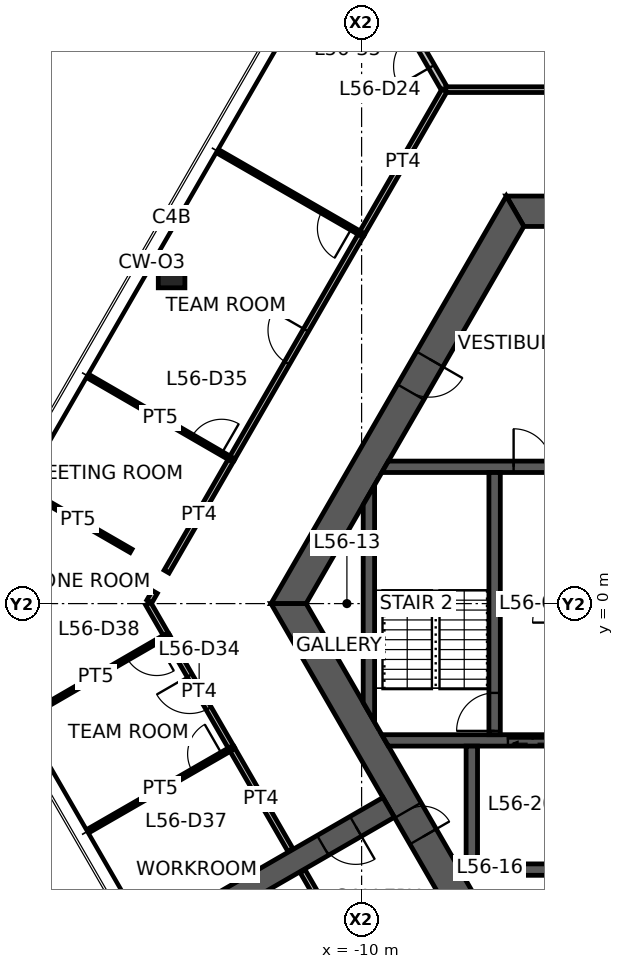
"""IFC4 building model, lengths in metres.
Left out: names, types, materials, properties, quantities, classifications, styles, units other than length and angle.
Written with IfcOpenShell. Run it as: python <this file> out.ifc"""

import sys

from ifc_helpers import new_model, si_unit, direction, frame, frame_2d, origin, origin_2d, place, context, subcontext, project, spatial, polyline, rectangle, hollow_rectangle, outline, extrude, element, fill, save


model = new_model("IFC4")
c1 = context("Model", 3, precision=1e-05, world=origin(), true_north=direction((0.0, 1.0)))
c2 = subcontext(c1, "Body", "Model", "MODEL_VIEW")
j1 = project(units=[si_unit("LENGTHUNIT", "METRE"), si_unit("PLANEANGLEUNIT", "RADIAN")], contexts=[c1])
p1 = place(None, origin())
s1 = spatial("IfcSite", under=j1, at=p1, CompositionType="ELEMENT")
p2 = place(p1, origin())
s2 = spatial("IfcBuilding", under=s1, at=p2, CompositionType="ELEMENT")
p3 = place(p2, frame((0.0, 0.0, 224.5)))
s3 = spatial("IfcBuildingStorey", under=s2, at=p3, CompositionType="ELEMENT", Elevation=224.5)
p4 = place(p3, frame((-15.0, 8.66, 0.0), z_axis=(0.0, 0.0, 1.0), x_axis=(1.0, 0.0, 0.0)))
e1 = element("IfcColumn", 1, at=p4, inside=s3, PredefinedType="COLUMN", context=c2, shape_type="SweptSolid", body=[
    extrude(hollow_rectangle(XDim=0.7, YDim=0.7, WallThickness=0.032, at=origin_2d()), origin(), (0.0, 0.0, 1.0), 3.9),
])
p5 = place(p3, frame((5.961, 10.325, 0.0), z_axis=(0.0, 0.0, 1.0), x_axis=(-1.0, 0.0, 0.0)))
e2 = element("IfcWall", 2, at=p5, inside=s3, PredefinedType="SHEAR", context=c2, shape_type="SweptSolid", body=[
    extrude(outline(polyline([(-0.231, -0.4), (4.636, -0.4), (5.536, -0.4), (6.386, -0.4), (7.286, -0.4), (12.153, -0.4), (11.691, 0.4), (7.286, 0.4), (6.386, 0.4), (5.536, 0.4), (4.636, 0.4), (0.231, 0.4), (-0.231, -0.4)])), origin(), (0.0, 0.0, 1.0), 3.9),
])
p6 = place(p5, frame((6.386, 0.0, 0.0)))
e3 = element("IfcOpeningElement", 3, at=p6, cuts=e2, PredefinedType="OPENING", context=c2, shape_type="SweptSolid", body=[
    extrude(rectangle(XDim=0.9, YDim=2.1, at=frame_2d((0.45, 1.05))), frame((0.0, 0.41, 0.0), z_axis=(0.0, -1.0, 0.0), x_axis=(1.0, 0.0, 0.0)), (0.0, 0.0, 1.0), 0.82),
])
p7 = place(p5, frame((4.636, 0.0, 0.0)))
e4 = element("IfcOpeningElement", 4, at=p7, cuts=e2, PredefinedType="OPENING", context=c2, shape_type="SweptSolid", body=[
    extrude(rectangle(XDim=0.9, YDim=2.1, at=frame_2d((0.45, 1.05))), frame((0.0, 0.41, 0.0), z_axis=(0.0, -1.0, 0.0), x_axis=(1.0, 0.0, 0.0)), (0.0, 0.0, 1.0), 0.82),
])
p8 = place(p3, frame((-5.961, 10.325, 0.0), z_axis=(0.0, 0.0, 1.0), x_axis=(-0.500004296715, -0.866022923061, 0.0)))
e5 = element("IfcWall", 5, at=p8, inside=s3, PredefinedType="SHEAR", context=c2, shape_type="SweptSolid", body=[
    extrude(outline(polyline([(-0.231, -0.4), (4.494, -0.4), (5.494, -0.4), (12.153, -0.4), (11.691, 0.4), (5.494, 0.4), (4.494, 0.4), (0.231, 0.4), (-0.231, -0.4)])), origin(), (0.0, 0.0, 1.0), 3.9),
])
p9 = place(p8, frame((4.494, 0.0, 0.0)))
e6 = element("IfcOpeningElement", 6, at=p9, cuts=e5, PredefinedType="OPENING", context=c2, shape_type="SweptSolid", body=[
    extrude(rectangle(XDim=1.0, YDim=2.1, at=frame_2d((0.5, 1.05))), frame((0.0, 0.41, 0.0), z_axis=(0.0, -1.0, 0.0), x_axis=(1.0, 0.0, 0.0)), (0.0, 0.0, 1.0), 0.82),
])
p10 = place(p3, frame((-11.922, 0.0, 0.0), z_axis=(0.0, 0.0, 1.0), x_axis=(0.500004296715, -0.866022923061, 0.0)))
e7 = element("IfcWall", 7, at=p10, inside=s3, PredefinedType="SHEAR", context=c2, shape_type="SweptSolid", body=[
    extrude(outline(polyline([(-0.231, -0.4), (6.281, -0.4), (7.081, -0.4), (12.153, -0.4), (11.691, 0.4), (7.081, 0.4), (6.281, 0.4), (0.231, 0.4), (-0.231, -0.4)])), origin(), (0.0, 0.0, 1.0), 3.9),
])
p11 = place(p10, frame((6.281, 0.0, 0.0)))
e8 = element("IfcOpeningElement", 8, at=p11, cuts=e7, PredefinedType="OPENING", context=c2, shape_type="SweptSolid", body=[
    extrude(rectangle(XDim=0.8, YDim=2.1, at=frame_2d((0.4, 1.05))), frame((0.0, 0.41, 0.0), z_axis=(0.0, -1.0, 0.0), x_axis=(1.0, 0.0, 0.0)), (0.0, 0.0, 1.0), 0.82),
])
p12 = place(p3, frame((-9.288, -5.363, 0.0), z_axis=(0.0, 0.0, 1.0), x_axis=(-0.866027473358, -0.499996415376, 0.0)))
e9 = element("IfcWall", 9, at=p12, inside=s3, PredefinedType="SHEAR", context=c2, shape_type="SweptSolid", body=[
    extrude(rectangle(XDim=7.045, YDim=0.6, at=frame_2d((3.523, 0.0))), origin(), (0.0, 0.0, 1.0), 3.9),
])
p13 = place(p12, frame((1.0, 0.0, 0.0)))
e10 = element("IfcOpeningElement", 10, at=p13, cuts=e9, PredefinedType="OPENING", context=c2, shape_type="SweptSolid", body=[
    extrude(rectangle(XDim=1.0, YDim=2.1, at=frame_2d((0.5, 1.05))), frame((0.0, 0.31, 0.0), z_axis=(0.0, -1.0, 0.0), x_axis=(1.0, 0.0, 0.0)), (0.0, 0.0, 1.0), 0.62),
])
p14 = place(p3, frame((-9.382, 3.6, 0.0), z_axis=(0.0, 0.0, 1.0), x_axis=(1.0, 0.0, 0.0)))
e11 = element("IfcWall", 11, at=p14, inside=s3, PredefinedType="SHEAR", context=c2, shape_type="SweptSolid", body=[
    extrude(outline(polyline([(-0.087, -0.15), (3.382, -0.15), (4.382, -0.15), (5.782, -0.15), (6.882, -0.15), (7.932, -0.15), (7.932, 0.15), (6.882, 0.15), (5.782, 0.15), (4.382, 0.15), (3.382, 0.15), (0.087, 0.15), (-0.087, -0.15)])), origin(), (0.0, 0.0, 1.0), 3.9),
])
p15 = place(p14, frame((3.382, 0.0, 0.0)))
e12 = element("IfcOpeningElement", 12, at=p15, cuts=e11, PredefinedType="OPENING", context=c2, shape_type="SweptSolid", body=[
    extrude(rectangle(XDim=1.0, YDim=2.1, at=frame_2d((0.5, 1.05))), frame((0.0, 0.16, 0.0), z_axis=(0.0, -1.0, 0.0), x_axis=(1.0, 0.0, 0.0)), (0.0, 0.0, 1.0), 0.32),
])
p16 = place(p14, frame((5.782, 0.0, 0.0)))
e13 = element("IfcOpeningElement", 13, at=p16, cuts=e11, PredefinedType="OPENING", context=c2, shape_type="SweptSolid", body=[
    extrude(rectangle(XDim=1.1, YDim=2.1, at=frame_2d((0.55, 1.05))), frame((0.0, 0.16, 0.0), z_axis=(0.0, -1.0, 0.0), x_axis=(1.0, 0.0, 0.0)), (0.0, 0.0, 1.0), 0.32),
])
p17 = place(p3, frame((-9.382, -3.6, 0.0), z_axis=(0.0, 0.0, 1.0), x_axis=(1.0, 0.0, 0.0)))
e14 = element("IfcWall", 14, at=p17, inside=s3, PredefinedType="SHEAR", context=c2, shape_type="SweptSolid", body=[
    extrude(outline(polyline([(0.087, -0.15), (3.232, -0.15), (4.532, -0.15), (5.782, -0.15), (6.882, -0.15), (7.932, -0.15), (7.932, 0.15), (6.882, 0.15), (5.782, 0.15), (4.532, 0.15), (3.232, 0.15), (-0.087, 0.15), (0.087, -0.15)])), origin(), (0.0, 0.0, 1.0), 3.9),
])
p18 = place(p17, frame((5.782, 0.0, 0.0)))
e15 = element("IfcOpeningElement", 15, at=p18, cuts=e14, PredefinedType="OPENING", context=c2, shape_type="SweptSolid", body=[
    extrude(rectangle(XDim=1.1, YDim=2.1, at=frame_2d((0.55, 1.05))), frame((0.0, 0.16, 0.0), z_axis=(0.0, -1.0, 0.0), x_axis=(1.0, 0.0, 0.0)), (0.0, 0.0, 1.0), 0.32),
])
p19 = place(p17, frame((3.232, 0.0, 0.0)))
e16 = element("IfcOpeningElement", 16, at=p19, cuts=e14, PredefinedType="OPENING", context=c2, shape_type="SweptSolid", body=[
    extrude(rectangle(XDim=1.3, YDim=2.1, at=frame_2d((0.65, 1.05))), frame((0.0, 0.16, 0.0), z_axis=(0.0, -1.0, 0.0), x_axis=(1.0, 0.0, 0.0)), (0.0, 0.0, 1.0), 0.32),
])
p20 = place(p3, frame((-6.5, -3.45, 0.0), z_axis=(0.0, 0.0, 1.0), x_axis=(0.0, 1.0, 0.0)))
e17 = element("IfcWall", 17, at=p20, inside=s3, PredefinedType="SHEAR", context=c2, shape_type="SweptSolid", body=[
    extrude(rectangle(XDim=6.9, YDim=0.3, at=frame_2d((3.45, 0.0))), origin(), (0.0, 0.0, 1.0), 3.9),
])
p21 = place(p20, frame((0.1, 0.0, 0.0)))
e18 = element("IfcOpeningElement", 18, at=p21, cuts=e17, PredefinedType="OPENING", context=c2, shape_type="SweptSolid", body=[
    extrude(rectangle(XDim=1.0, YDim=2.1, at=frame_2d((0.5, 1.05))), frame((0.0, 0.16, 0.0), z_axis=(0.0, -1.0, 0.0), x_axis=(1.0, 0.0, 0.0)), (0.0, 0.0, 1.0), 0.32),
])
p22 = place(p3, frame((-7.25, -7.0, 0.0), z_axis=(0.0, 0.0, 1.0), x_axis=(1.0, 0.0, 0.0)))
e19 = element("IfcWall", 19, at=p22, inside=s3, PredefinedType="SHEAR", context=c2, shape_type="SweptSolid", body=[
    extrude(rectangle(XDim=2.6, YDim=0.3, at=frame_2d((1.3, 0.0))), origin(), (0.0, 0.0, 1.0), 3.9),
])
p23 = place(p3, frame((-7.1, -3.75, 0.0), z_axis=(0.0, 0.0, 1.0), x_axis=(0.0, -1.0, 0.0)))
e20 = element("IfcWall", 20, at=p23, inside=s3, PredefinedType="SHEAR", context=c2, shape_type="SweptSolid", body=[
    extrude(rectangle(XDim=3.1, YDim=0.3, at=frame_2d((1.55, 0.0))), origin(), (0.0, 0.0, 1.0), 3.9),
])
p24 = place(p3, frame((-9.808, -2.862, 0.0), z_axis=(0.0, 0.0, 1.0), x_axis=(0.0, 1.0, 0.0)))
e21 = element("IfcWall", 21, at=p24, inside=s3, PredefinedType="SHEAR", context=c2, shape_type="SweptSolid", body=[
    extrude(outline(polyline([(-0.26, -0.15), (5.984, -0.15), (5.465, 0.15), (0.26, 0.15), (-0.26, -0.15)])), origin(), (0.0, 0.0, 1.0), 3.9),
])
p25 = place(p3, frame((-7.809, 13.525, 0.0), z_axis=(0.0, 0.0, 1.0), x_axis=(-0.499997299682, 0.866026962808, 0.0)))
e22 = element("IfcWall", 22, at=p25, inside=s3, PredefinedType="PARTITIONING", context=c2, shape_type="SweptSolid", body=[
    extrude(rectangle(XDim=4.383, YDim=0.175, at=frame_2d((2.191, 0.0))), origin(), (0.0, 0.0, 1.0), 3.05),
])
p26 = place(p25, frame((0.7, 0.0, 0.0)))
e23 = element("IfcOpeningElement", 23, at=p26, cuts=e22, PredefinedType="OPENING", context=c2, shape_type="SweptSolid", body=[
    extrude(rectangle(XDim=1.0, YDim=2.1, at=frame_2d((0.5, 1.05))), frame((0.0, 0.098, 0.0), z_axis=(0.0, -1.0, 0.0), x_axis=(1.0, 0.0, 0.0)), (0.0, 0.0, 1.0), 0.195),
])
p27 = place(p3, frame((-7.786, 13.525, 0.0), z_axis=(0.0, 0.0, 1.0), x_axis=(1.0, 0.0, 0.0)))
e24 = element("IfcWall", 24, at=p27, inside=s3, PredefinedType="PARTITIONING", context=c2, shape_type="SweptSolid", body=[
    extrude(rectangle(XDim=7.466, YDim=0.15, at=frame_2d((3.733, 0.0))), origin(), (0.0, 0.0, 1.0), 2.95),
])
p28 = place(p27, frame((3.233, 0.0, 0.0)))
e25 = element("IfcOpeningElement", 25, at=p28, cuts=e24, PredefinedType="OPENING", context=c2, shape_type="SweptSolid", body=[
    extrude(rectangle(XDim=1.0, YDim=2.1, at=frame_2d((0.5, 1.05))), frame((0.0, 0.085, 0.0), z_axis=(0.0, -1.0, 0.0), x_axis=(1.0, 0.0, 0.0)), (0.0, 0.0, 1.0), 0.17),
])
p29 = place(p3, frame((-15.131, 0.842, 0.0), z_axis=(0.0, 0.0, 1.0), x_axis=(0.500032973541, 0.866006365664, 0.0)))
e26 = element("IfcWall", 26, at=p29, inside=s3, PredefinedType="PARTITIONING", context=c2, shape_type="SweptSolid", body=[
    extrude(rectangle(XDim=3.426, YDim=0.15, at=frame_2d((1.713, 0.0))), origin(), (0.0, 0.0, 1.0), 2.95),
])
p30 = place(p3, frame((-10.008, 9.716, 0.0), z_axis=(0.0, 0.0, 1.0), x_axis=(0.500004234368, 0.866022959057, 0.0)))
e27 = element("IfcWall", 27, at=p30, inside=s3, PredefinedType="PARTITIONING", context=c2, shape_type="SweptSolid", body=[
    extrude(rectangle(XDim=4.375, YDim=0.15, at=frame_2d((2.188, 0.0))), origin(), (0.0, 0.0, 1.0), 2.95),
])
p31 = place(p3, frame((-11.873, -6.485, 0.0), z_axis=(0.0, 0.0, 1.0), x_axis=(-0.499958760481, 0.866049212123, 0.0)))
e28 = element("IfcWall", 28, at=p31, inside=s3, PredefinedType="PARTITIONING", context=c2, shape_type="SweptSolid", body=[
    extrude(rectangle(XDim=3.1, YDim=0.15, at=frame_2d((1.55, 0.0))), origin(), (0.0, 0.0, 1.0), 2.95),
])
p32 = place(p3, frame((-15.585, 0.056, 0.0), z_axis=(0.0, 0.0, 1.0), x_axis=(0.500164219654, 0.865930570761, 0.0)))
e29 = element("IfcWall", 29, at=p32, inside=s3, PredefinedType="PARTITIONING", context=c2, shape_type="SweptSolid", body=[
    extrude(rectangle(XDim=0.287, YDim=0.15, at=frame_2d((0.144, 0.0))), origin(), (0.0, 0.0, 1.0), 2.95),
])
p33 = place(p3, frame((-15.126, -0.851, 0.0), z_axis=(0.0, 0.0, 1.0), x_axis=(-0.499880173341, 0.866094574686, 0.0)))
e30 = element("IfcWall", 30, at=p33, inside=s3, PredefinedType="PARTITIONING", context=c2, shape_type="SweptSolid", body=[
    extrude(rectangle(XDim=0.983, YDim=0.15, at=frame_2d((0.491, 0.0))), origin(), (0.0, 0.0, 1.0), 2.95),
])
p34 = place(p3, frame((-13.423, 3.801, 0.0), z_axis=(0.0, 0.0, 1.0), x_axis=(0.500020088259, 0.866013805512, 0.0)))
e31 = element("IfcWall", 31, at=p34, inside=s3, PredefinedType="PARTITIONING", context=c2, shape_type="SweptSolid", body=[
    extrude(rectangle(XDim=6.84, YDim=0.15, at=frame_2d((3.42, 0.0))), origin(), (0.0, 0.0, 1.0), 2.95),
])
p35 = place(p34, frame((2.92, 0.0, 0.0)))
e32 = element("IfcOpeningElement", 32, at=p35, cuts=e31, PredefinedType="OPENING", context=c2, shape_type="SweptSolid", body=[
    extrude(rectangle(XDim=1.0, YDim=2.1, at=frame_2d((0.5, 1.05))), frame((0.0, 0.085, 0.0), z_axis=(0.0, -1.0, 0.0), x_axis=(1.0, 0.0, 0.0)), (0.0, 0.0, 1.0), 0.17),
])
p36 = place(p3, frame((-13.418, -3.809, 0.0), z_axis=(0.0, 0.0, 1.0), x_axis=(-0.499996058069, 0.866027679647, 0.0)))
e33 = element("IfcWall", 33, at=p36, inside=s3, PredefinedType="PARTITIONING", context=c2, shape_type="SweptSolid", body=[
    extrude(rectangle(XDim=3.424, YDim=0.15, at=frame_2d((1.712, 0.0))), origin(), (0.0, 0.0, 1.0), 2.95),
])
p37 = place(p36, frame((1.212, 0.0, 0.0)))
e34 = element("IfcOpeningElement", 34, at=p37, cuts=e33, PredefinedType="OPENING", context=c2, shape_type="SweptSolid", body=[
    extrude(rectangle(XDim=1.0, YDim=2.1, at=frame_2d((0.5, 1.05))), frame((0.0, 0.085, 0.0), z_axis=(0.0, -1.0, 0.0), x_axis=(1.0, 0.0, 0.0)), (0.0, 0.0, 1.0), 0.17),
])
p38 = place(p3, frame((-16.067, 1.388, 0.0), z_axis=(0.0, 0.0, 1.0), x_axis=(-0.866010186656, 0.500026355914, 0.0)))
e35 = element("IfcWall", 35, at=p38, inside=s3, PredefinedType="PARTITIONING", context=c2, shape_type="SweptSolid", body=[
    extrude(rectangle(XDim=3.222, YDim=0.1, at=frame_2d((1.611, 0.0))), origin(), (0.0, 0.0, 1.0), 2.95),
])
p39 = place(p3, frame((-17.171, 5.97, 0.0), z_axis=(0.0, 0.0, 1.0), x_axis=(0.865485466478, -0.500934034894, 0.0)))
e36 = element("IfcWall", 36, at=p39, inside=s3, PredefinedType="PARTITIONING", context=c2, shape_type="SweptSolid", body=[
    extrude(rectangle(XDim=4.33, YDim=0.1, at=frame_2d((2.165, 0.0))), origin(), (0.0, 0.0, 1.0), 2.95),
])
p40 = place(p39, frame((3.131, 0.0, 0.0)))
e37 = element("IfcOpeningElement", 37, at=p40, cuts=e36, PredefinedType="OPENING", context=c2, shape_type="SweptSolid", body=[
    extrude(rectangle(XDim=0.9, YDim=2.1, at=frame_2d((0.45, 1.05))), frame((0.0, 0.06, 0.0), z_axis=(0.0, -1.0, 0.0), x_axis=(1.0, 0.0, 0.0)), (0.0, 0.0, 1.0), 0.12),
])
p41 = place(p3, frame((-10.003, 9.724, 0.0), z_axis=(0.0, 0.0, 1.0), x_axis=(-0.866566724083, 0.499061231426, 0.0)))
e38 = element("IfcWall", 38, at=p41, inside=s3, PredefinedType="PARTITIONING", context=c2, shape_type="SweptSolid", body=[
    extrude(rectangle(XDim=4.305, YDim=0.1, at=frame_2d((2.153, 0.0))), origin(), (0.0, 0.0, 1.0), 2.95),
])
p42 = place(p41, frame((0.3, 0.0, 0.0)))
e39 = element("IfcOpeningElement", 39, at=p42, cuts=e38, PredefinedType="OPENING", context=c2, shape_type="SweptSolid", body=[
    extrude(rectangle(XDim=0.9, YDim=2.1, at=frame_2d((0.45, 1.05))), frame((0.0, 0.06, 0.0), z_axis=(0.0, -1.0, 0.0), x_axis=(1.0, 0.0, 0.0)), (0.0, 0.0, 1.0), 0.12),
])
p43 = place(p3, frame((-17.171, -5.97, 0.0), z_axis=(0.0, 0.0, 1.0), x_axis=(0.866548575966, 0.499092742374, 0.0)))
e40 = element("IfcWall", 40, at=p43, inside=s3, PredefinedType="PARTITIONING", context=c2, shape_type="SweptSolid", body=[
    extrude(rectangle(XDim=4.331, YDim=0.1, at=frame_2d((2.165, 0.0))), origin(), (0.0, 0.0, 1.0), 2.95),
])
p44 = place(p43, frame((3.131, 0.0, 0.0)))
e41 = element("IfcOpeningElement", 41, at=p44, cuts=e40, PredefinedType="OPENING", context=c2, shape_type="SweptSolid", body=[
    extrude(rectangle(XDim=0.9, YDim=2.1, at=frame_2d((0.45, 1.05))), frame((0.0, 0.06, 0.0), z_axis=(0.0, -1.0, 0.0), x_axis=(1.0, 0.0, 0.0)), (0.0, 0.0, 1.0), 0.12),
])
p45 = place(p3, frame((-15.131, -0.843, 0.0), z_axis=(0.0, 0.0, 1.0), x_axis=(-0.865525911664, -0.500864149484, 0.0)))
e42 = element("IfcWall", 42, at=p45, inside=s3, PredefinedType="PARTITIONING", context=c2, shape_type="SweptSolid", body=[
    extrude(rectangle(XDim=4.306, YDim=0.1, at=frame_2d((2.153, 0.0))), origin(), (0.0, 0.0, 1.0), 2.95),
])
p46 = place(p45, frame((0.3, 0.0, 0.0)))
e43 = element("IfcOpeningElement", 43, at=p46, cuts=e42, PredefinedType="OPENING", context=c2, shape_type="SweptSolid", body=[
    extrude(rectangle(XDim=0.9, YDim=2.1, at=frame_2d((0.45, 1.05))), frame((0.0, 0.06, 0.0), z_axis=(0.0, -1.0, 0.0), x_axis=(1.0, 0.0, 0.0)), (0.0, 0.0, 1.0), 0.12),
])
p47 = place(p3, frame((-10.911, -8.152, 0.0), z_axis=(0.0, 0.0, 1.0), x_axis=(-0.499859560919, 0.866106471144, 0.0)))
e44 = element("IfcWall", 44, at=p47, inside=s3, PredefinedType="PARTITIONING", context=c2, shape_type="SweptSolid", body=[
    extrude(rectangle(XDim=1.284, YDim=0.15, at=frame_2d((0.642, 0.0))), origin(), (0.0, 0.0, 1.0), 2.95),
])
p48 = place(p11, origin())
e45 = element("IfcDoor", 45, at=p48, inside=s3, OperationType="SINGLE_SWING_RIGHT", PredefinedType="DOOR", context=c2, shape_type="SweptSolid", body=[
    extrude(rectangle(XDim=0.8, YDim=2.1, at=frame_2d((0.4, 1.05))), frame((0.0, 0.025, 0.0), z_axis=(0.0, -1.0, 0.0), x_axis=(1.0, 0.0, 0.0)), (0.0, 0.0, 1.0), 0.05),
])
fill(e8, e45)
p49 = place(p9, origin())
e46 = element("IfcDoor", 46, at=p49, inside=s3, OperationType="SINGLE_SWING_LEFT", PredefinedType="DOOR", context=c2, shape_type="SweptSolid", body=[
    extrude(rectangle(XDim=1.0, YDim=2.1, at=frame_2d((0.5, 1.05))), frame((0.0, 0.025, 0.0), z_axis=(0.0, -1.0, 0.0), x_axis=(1.0, 0.0, 0.0)), (0.0, 0.0, 1.0), 0.05),
])
fill(e6, e46)
p50 = place(p21, origin())
e47 = element("IfcDoor", 47, at=p50, inside=s3, OperationType="SINGLE_SWING_LEFT", PredefinedType="DOOR", context=c2, shape_type="SweptSolid", body=[
    extrude(rectangle(XDim=1.0, YDim=2.1, at=frame_2d((0.5, 1.05))), frame((0.0, 0.025, 0.0), z_axis=(0.0, -1.0, 0.0), x_axis=(1.0, 0.0, 0.0)), (0.0, 0.0, 1.0), 0.05),
])
fill(e18, e47)
p51 = place(p15, origin())
e48 = element("IfcDoor", 48, at=p51, inside=s3, OperationType="SINGLE_SWING_LEFT", PredefinedType="DOOR", context=c2, shape_type="SweptSolid", body=[
    extrude(rectangle(XDim=1.0, YDim=2.1, at=frame_2d((0.5, 1.05))), frame((0.0, 0.025, 0.0), z_axis=(0.0, -1.0, 0.0), x_axis=(1.0, 0.0, 0.0)), (0.0, 0.0, 1.0), 0.05),
])
fill(e12, e48)
p52 = place(p13, origin())
e49 = element("IfcDoor", 49, at=p52, inside=s3, OperationType="SINGLE_SWING_LEFT", PredefinedType="DOOR", context=c2, shape_type="SweptSolid", body=[
    extrude(rectangle(XDim=1.0, YDim=2.1, at=frame_2d((0.5, 1.05))), frame((0.0, 0.025, 0.0), z_axis=(0.0, -1.0, 0.0), x_axis=(1.0, 0.0, 0.0)), (0.0, 0.0, 1.0), 0.05),
])
fill(e10, e49)
p53 = place(p26, origin())
e50 = element("IfcDoor", 50, at=p53, inside=s3, OperationType="SINGLE_SWING_LEFT", PredefinedType="DOOR", context=c2, shape_type="SweptSolid", body=[
    extrude(rectangle(XDim=1.0, YDim=2.1, at=frame_2d((0.5, 1.05))), frame((0.0, 0.025, 0.0), z_axis=(0.0, -1.0, 0.0), x_axis=(1.0, 0.0, 0.0)), (0.0, 0.0, 1.0), 0.05),
])
fill(e23, e50)
p54 = place(p35, origin())
e51 = element("IfcDoor", 51, at=p54, inside=s3, OperationType="SINGLE_SWING_RIGHT", PredefinedType="DOOR", context=c2, shape_type="SweptSolid", body=[
    extrude(rectangle(XDim=1.0, YDim=2.1, at=frame_2d((0.5, 1.05))), frame((0.0, 0.025, 0.0), z_axis=(0.0, -1.0, 0.0), x_axis=(1.0, 0.0, 0.0)), (0.0, 0.0, 1.0), 0.05),
])
fill(e32, e51)
p55 = place(p37, origin())
e52 = element("IfcDoor", 52, at=p55, inside=s3, OperationType="SINGLE_SWING_RIGHT", PredefinedType="DOOR", context=c2, shape_type="SweptSolid", body=[
    extrude(rectangle(XDim=1.0, YDim=2.1, at=frame_2d((0.5, 1.05))), frame((0.0, 0.025, 0.0), z_axis=(0.0, -1.0, 0.0), x_axis=(1.0, 0.0, 0.0)), (0.0, 0.0, 1.0), 0.05),
])
fill(e34, e52)
p56 = place(p40, origin())
e53 = element("IfcDoor", 53, at=p56, inside=s3, OperationType="SINGLE_SWING_RIGHT", PredefinedType="DOOR", context=c2, shape_type="SweptSolid", body=[
    extrude(rectangle(XDim=0.9, YDim=2.1, at=frame_2d((0.45, 1.05))), frame((0.0, 0.025, 0.0), z_axis=(0.0, -1.0, 0.0), x_axis=(1.0, 0.0, 0.0)), (0.0, 0.0, 1.0), 0.05),
])
fill(e37, e53)
p57 = place(p42, origin())
e54 = element("IfcDoor", 54, at=p57, inside=s3, OperationType="SINGLE_SWING_LEFT", PredefinedType="DOOR", context=c2, shape_type="SweptSolid", body=[
    extrude(rectangle(XDim=0.9, YDim=2.1, at=frame_2d((0.45, 1.05))), frame((0.0, 0.025, 0.0), z_axis=(0.0, -1.0, 0.0), x_axis=(1.0, 0.0, 0.0)), (0.0, 0.0, 1.0), 0.05),
])
fill(e39, e54)
p58 = place(p44, origin())
e55 = element("IfcDoor", 55, at=p58, inside=s3, OperationType="SINGLE_SWING_RIGHT", PredefinedType="DOOR", context=c2, shape_type="SweptSolid", body=[
    extrude(rectangle(XDim=0.9, YDim=2.1, at=frame_2d((0.45, 1.05))), frame((0.0, 0.025, 0.0), z_axis=(0.0, -1.0, 0.0), x_axis=(1.0, 0.0, 0.0)), (0.0, 0.0, 1.0), 0.05),
])
fill(e41, e55)
p59 = place(p46, origin())
e56 = element("IfcDoor", 56, at=p59, inside=s3, OperationType="SINGLE_SWING_LEFT", PredefinedType="DOOR", context=c2, shape_type="SweptSolid", body=[
    extrude(rectangle(XDim=0.9, YDim=2.1, at=frame_2d((0.45, 1.05))), frame((0.0, 0.025, 0.0), z_axis=(0.0, -1.0, 0.0), x_axis=(1.0, 0.0, 0.0)), (0.0, 0.0, 1.0), 0.05),
])
fill(e43, e56)
p60 = place(p19, origin())
e57 = element("IfcDoor", 57, at=p60, inside=s3, OperationType="DOUBLE_DOOR_SLIDING", PredefinedType="DOOR", context=c2, shape_type="SweptSolid", body=[
    extrude(rectangle(XDim=1.3, YDim=2.1, at=frame_2d((0.65, 1.05))), frame((0.0, 0.025, 0.0), z_axis=(0.0, -1.0, 0.0), x_axis=(1.0, 0.0, 0.0)), (0.0, 0.0, 1.0), 0.05),
])
fill(e16, e57)
save(model, sys.argv[1])
